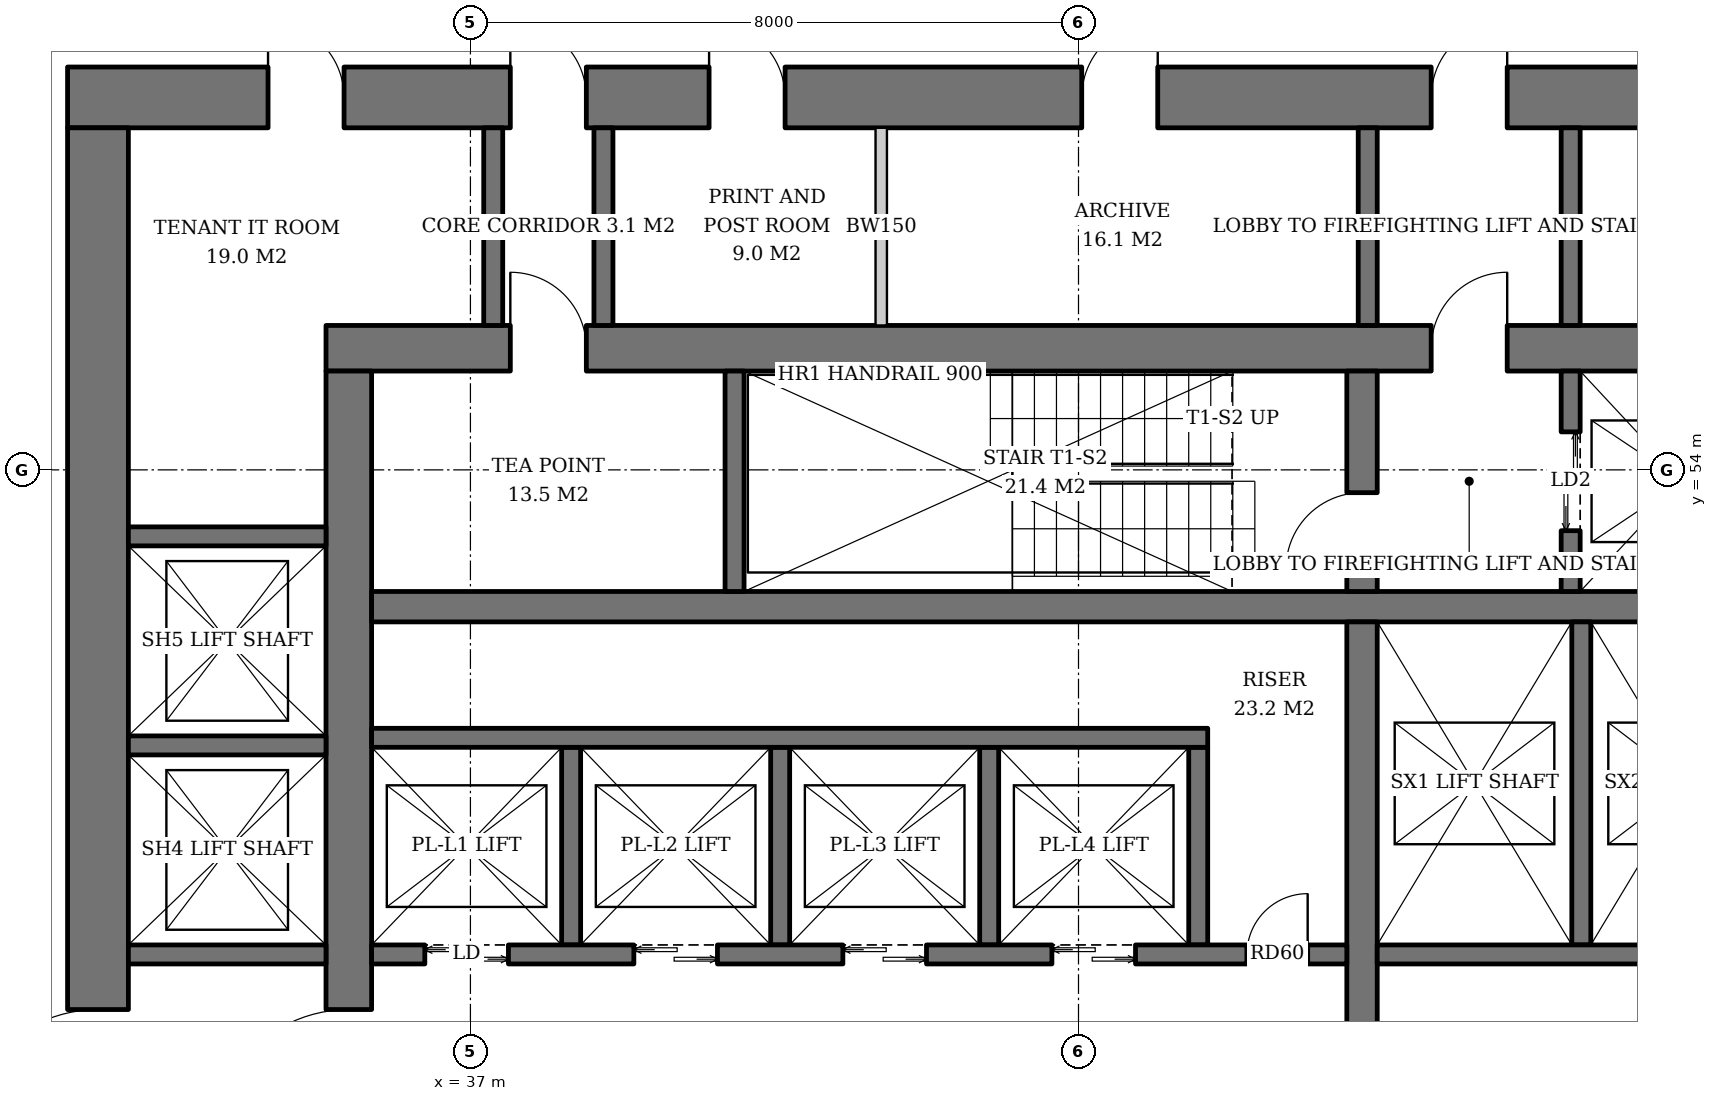
"""IFC4 building model, lengths in metres.
Left out: names, types, materials, properties, quantities, classifications, styles, units other than length and angle.
Written with IfcOpenShell. Run it as: python <this file> out.ifc"""

import sys

from ifc_helpers import new_model, si_unit, direction, frame, frame_2d, origin, place, context, subcontext, project, spatial, rectangle, extrude, element, fill, save


model = new_model("IFC4")
c1 = context("Model", 3, precision=1e-05, world=origin(), true_north=direction((0.0, 1.0)))
c2 = subcontext(c1, "Body", "Model", "MODEL_VIEW")
j1 = project(units=[si_unit("LENGTHUNIT", "METRE"), si_unit("PLANEANGLEUNIT", "RADIAN")], contexts=[c1])
p1 = place(None, origin())
s1 = spatial("IfcSite", under=j1, at=p1, CompositionType="ELEMENT")
p2 = place(p1, origin())
s2 = spatial("IfcBuilding", under=s1, at=p2, CompositionType="ELEMENT")
p3 = place(p2, frame((0.0, 0.0, 62.8)))
s3 = spatial("IfcBuildingStorey", under=s2, at=p3, CompositionType="ELEMENT", Elevation=62.8)
p4 = place(p3, frame((35.1, 55.6, 0.0), z_axis=(0.0, 0.0, 1.0), x_axis=(1.0, 0.0, 0.0)))
e1 = element("IfcWall", 1, at=p4, inside=s3, PredefinedType="SHEAR", context=c2, shape_type="SweptSolid", body=[
    extrude(rectangle(XDim=19.8, YDim=0.6, at=frame_2d((9.9, 0.0))), origin(), (0.0, 0.0, 1.0), 3.8),
])
p5 = place(p4, frame((14.54, 0.0, 0.0)))
e2 = element("IfcOpeningElement", 2, at=p5, cuts=e1, PredefinedType="OPENING", context=c2, shape_type="SweptSolid", body=[
    extrude(rectangle(XDim=1.0, YDim=2.1, at=frame_2d((0.5, 1.05))), frame((0.0, 0.31, 0.0), z_axis=(0.0, -1.0, 0.0), x_axis=(1.0, 0.0, 0.0)), (0.0, 0.0, 1.0), 0.62),
])
p6 = place(p4, frame((2.425, 0.0, 0.0)))
e3 = element("IfcOpeningElement", 3, at=p6, cuts=e1, PredefinedType="OPENING", context=c2, shape_type="SweptSolid", body=[
    extrude(rectangle(XDim=1.0, YDim=2.1, at=frame_2d((0.5, 1.05))), frame((0.0, 0.31, 0.0), z_axis=(0.0, -1.0, 0.0), x_axis=(1.0, 0.0, 0.0)), (0.0, 0.0, 1.0), 0.62),
])
p7 = place(p3, frame((35.4, 36.7, 0.0), z_axis=(0.0, 0.0, 1.0), x_axis=(0.0, 1.0, 0.0)))
e4 = element("IfcWall", 4, at=p7, inside=s3, PredefinedType="SHEAR", context=c2, shape_type="SweptSolid", body=[
    extrude(rectangle(XDim=18.6, YDim=0.6, at=frame_2d((9.3, 0.0))), origin(), (0.0, 0.0, 1.0), 3.8),
])
p8 = place(p7, frame((8.4, 0.0, 0.0)))
e5 = element("IfcOpeningElement", 5, at=p8, cuts=e4, PredefinedType="OPENING", context=c2, shape_type="SweptSolid", body=[
    extrude(rectangle(XDim=1.8, YDim=2.4, at=frame_2d((0.9, 1.2))), frame((0.0, 0.31, 0.0), z_axis=(0.0, -1.0, 0.0), x_axis=(1.0, 0.0, 0.0)), (0.0, 0.0, 1.0), 0.62),
])
p9 = place(p3, frame((31.7, 58.9, 0.0), z_axis=(0.0, 0.0, 1.0), x_axis=(1.0, 0.0, 0.0)))
e6 = element("IfcWall", 6, at=p9, inside=s3, PredefinedType="SHEAR", context=c2, shape_type="SweptSolid", body=[
    extrude(rectangle(XDim=26.6, YDim=0.8, at=frame_2d((13.3, 0.0))), origin(), (0.0, 0.0, 1.0), 3.8),
])
p10 = place(p9, frame((17.94, 0.0, 0.0)))
e7 = element("IfcOpeningElement", 7, at=p10, cuts=e6, PredefinedType="OPENING", context=c2, shape_type="SweptSolid", body=[
    extrude(rectangle(XDim=1.0, YDim=2.1, at=frame_2d((0.5, 1.05))), frame((0.0, 0.41, 0.0), z_axis=(0.0, -1.0, 0.0), x_axis=(1.0, 0.0, 0.0)), (0.0, 0.0, 1.0), 0.82),
])
p11 = place(p9, frame((5.825, 0.0, 0.0)))
e8 = element("IfcOpeningElement", 8, at=p11, cuts=e6, PredefinedType="OPENING", context=c2, shape_type="SweptSolid", body=[
    extrude(rectangle(XDim=1.0, YDim=2.1, at=frame_2d((0.5, 1.05))), frame((0.0, 0.41, 0.0), z_axis=(0.0, -1.0, 0.0), x_axis=(1.0, 0.0, 0.0)), (0.0, 0.0, 1.0), 0.82),
])
p12 = place(p9, frame((2.637, 0.0, 0.0)))
e9 = element("IfcOpeningElement", 9, at=p12, cuts=e6, PredefinedType="OPENING", context=c2, shape_type="SweptSolid", body=[
    extrude(rectangle(XDim=1.0, YDim=2.1, at=frame_2d((0.5, 1.05))), frame((0.0, 0.41, 0.0), z_axis=(0.0, -1.0, 0.0), x_axis=(1.0, 0.0, 0.0)), (0.0, 0.0, 1.0), 0.82),
])
p13 = place(p9, frame((8.44, 0.0, 0.0)))
e10 = element("IfcOpeningElement", 10, at=p13, cuts=e6, PredefinedType="OPENING", context=c2, shape_type="SweptSolid", body=[
    extrude(rectangle(XDim=1.0, YDim=2.1, at=frame_2d((0.5, 1.05))), frame((0.0, 0.41, 0.0), z_axis=(0.0, -1.0, 0.0), x_axis=(1.0, 0.0, 0.0)), (0.0, 0.0, 1.0), 0.82),
])
p14 = place(p9, frame((13.342, 0.0, 0.0)))
e11 = element("IfcOpeningElement", 11, at=p14, cuts=e6, PredefinedType="OPENING", context=c2, shape_type="SweptSolid", body=[
    extrude(rectangle(XDim=1.0, YDim=2.1, at=frame_2d((0.5, 1.05))), frame((0.0, 0.41, 0.0), z_axis=(0.0, -1.0, 0.0), x_axis=(1.0, 0.0, 0.0)), (0.0, 0.0, 1.0), 0.82),
])
p15 = place(p9, frame((22.35, 0.0, 0.0)))
e12 = element("IfcOpeningElement", 12, at=p15, cuts=e6, PredefinedType="OPENING", context=c2, shape_type="SweptSolid", body=[
    extrude(rectangle(XDim=1.0, YDim=2.1, at=frame_2d((0.5, 1.05))), frame((0.0, 0.41, 0.0), z_axis=(0.0, -1.0, 0.0), x_axis=(1.0, 0.0, 0.0)), (0.0, 0.0, 1.0), 0.82),
])
p16 = place(p3, frame((32.1, 33.5, 0.0), z_axis=(0.0, 0.0, 1.0), x_axis=(0.0, 1.0, 0.0)))
e13 = element("IfcWall", 13, at=p16, inside=s3, PredefinedType="SHEAR", context=c2, shape_type="SweptSolid", body=[
    extrude(rectangle(XDim=25.0, YDim=0.8, at=frame_2d((12.5, 0.0))), origin(), (0.0, 0.0, 1.0), 3.8),
])
p17 = place(p16, frame((11.6, 0.0, 0.0)))
e14 = element("IfcOpeningElement", 14, at=p17, cuts=e13, PredefinedType="OPENING", context=c2, shape_type="SweptSolid", body=[
    extrude(rectangle(XDim=1.8, YDim=2.4, at=frame_2d((0.9, 1.2))), frame((0.0, 0.41, 0.0), z_axis=(0.0, -1.0, 0.0), x_axis=(1.0, 0.0, 0.0)), (0.0, 0.0, 1.0), 0.82),
])
p18 = place(p3, frame((35.7, 52.2, 0.0), z_axis=(0.0, 0.0, 1.0), x_axis=(1.0, 0.0, 0.0)))
e15 = element("IfcWall", 15, at=p18, inside=s3, PredefinedType="SHEAR", context=c2, shape_type="SweptSolid", body=[
    extrude(rectangle(XDim=18.6, YDim=0.4, at=frame_2d((9.3, 0.0))), origin(), (0.0, 0.0, 1.0), 3.8),
])
p19 = place(p3, frame((48.73, 40.0, 0.0), z_axis=(0.0, 0.0, 1.0), x_axis=(0.0, 1.0, 0.0)))
e16 = element("IfcWall", 16, at=p19, inside=s3, PredefinedType="SHEAR", context=c2, shape_type="SweptSolid", body=[
    extrude(rectangle(XDim=12.0, YDim=0.4, at=frame_2d((6.0, 0.0))), origin(), (0.0, 0.0, 1.0), 3.8),
])
p20 = place(p3, frame((48.73, 52.4, 0.0), z_axis=(0.0, 0.0, 1.0), x_axis=(0.0, 1.0, 0.0)))
e17 = element("IfcWall", 17, at=p20, inside=s3, PredefinedType="SHEAR", context=c2, shape_type="SweptSolid", body=[
    extrude(rectangle(XDim=2.9, YDim=0.4, at=frame_2d((1.45, 0.0))), origin(), (0.0, 0.0, 1.0), 3.8),
])
p21 = place(p20, frame((0.3, 0.0, 0.0)))
e18 = element("IfcOpeningElement", 18, at=p21, cuts=e17, PredefinedType="OPENING", context=c2, shape_type="SweptSolid", body=[
    extrude(rectangle(XDim=1.0, YDim=2.1, at=frame_2d((0.5, 1.05))), frame((0.0, 0.21, 0.0), z_axis=(0.0, -1.0, 0.0), x_axis=(1.0, 0.0, 0.0)), (0.0, 0.0, 1.0), 0.42),
])
p22 = place(p3, frame((40.475, 52.4, 0.0), z_axis=(0.0, 0.0, 1.0), x_axis=(0.0, 1.0, 0.0)))
e19 = element("IfcWall", 19, at=p22, inside=s3, PredefinedType="SHEAR", context=c2, shape_type="SweptSolid", body=[
    extrude(rectangle(XDim=2.9, YDim=0.25, at=frame_2d((1.45, 0.0))), origin(), (0.0, 0.0, 1.0), 3.8),
])
p23 = place(p3, frame((51.475, 52.4, 0.0), z_axis=(0.0, 0.0, 1.0), x_axis=(0.0, 1.0, 0.0)))
e20 = element("IfcWall", 20, at=p23, inside=s3, PredefinedType="SHEAR", context=c2, shape_type="SweptSolid", body=[
    extrude(rectangle(XDim=2.9, YDim=0.25, at=frame_2d((1.45, 0.0))), origin(), (0.0, 0.0, 1.0), 3.8),
])
p24 = place(p23, frame((0.8, 0.0, 0.0)))
e21 = element("IfcOpeningElement", 21, at=p24, cuts=e20, PredefinedType="OPENING", context=c2, shape_type="SweptSolid", body=[
    extrude(rectangle(XDim=1.3, YDim=2.2, at=frame_2d((0.65, 1.1))), frame((0.0, 0.135, 0.0), z_axis=(0.0, -1.0, 0.0), x_axis=(1.0, 0.0, 0.0)), (0.0, 0.0, 1.0), 0.27),
])
for number, where, z_axis, x_axis in (
    (22, (38.325, 47.75, 0.0), (0.0, 0.0, 1.0), (0.0, 1.0, 0.0)),
    (23, (41.075, 47.75, 0.0), (0.0, 0.0, 1.0), (0.0, 1.0, 0.0)),
    (24, (43.825, 47.75, 0.0), (0.0, 0.0, 1.0), (0.0, 1.0, 0.0)),
    (25, (46.575, 47.75, 0.0), (0.0, 0.0, 1.0), (0.0, 1.0, 0.0)),
):
    element("IfcWall", number, at=place(p3, frame(where, z_axis=z_axis, x_axis=x_axis)), inside=s3, PredefinedType="SHEAR", context=c2, shape_type="SweptSolid", body=[
        extrude(rectangle(XDim=2.6, YDim=0.25, at=frame_2d((1.3, 0.0))), origin(), (0.0, 0.0, 1.0), 3.8),
    ])
p25 = place(p3, frame((35.7, 50.475, 0.0), z_axis=(0.0, 0.0, 1.0), x_axis=(1.0, 0.0, 0.0)))
e26 = element("IfcWall", 26, at=p25, inside=s3, PredefinedType="SHEAR", context=c2, shape_type="SweptSolid", body=[
    extrude(rectangle(XDim=11.0, YDim=0.25, at=frame_2d((5.5, 0.0))), origin(), (0.0, 0.0, 1.0), 3.8),
])
p26 = place(p3, frame((35.7, 47.625, 0.0), z_axis=(0.0, 0.0, 1.0), x_axis=(1.0, 0.0, 0.0)))
e27 = element("IfcWall", 27, at=p26, inside=s3, PredefinedType="SHEAR", context=c2, shape_type="SweptSolid", body=[
    extrude(rectangle(XDim=12.83, YDim=0.25, at=frame_2d((6.415, 0.0))), origin(), (0.0, 0.0, 1.0), 3.8),
])
p27 = place(p26, frame((0.7, 0.0, 0.0)))
e28 = element("IfcOpeningElement", 28, at=p27, cuts=e27, PredefinedType="OPENING", context=c2, shape_type="SweptSolid", body=[
    extrude(rectangle(XDim=1.1, YDim=2.2, at=frame_2d((0.55, 1.1))), frame((0.0, 0.135, 0.0), z_axis=(0.0, -1.0, 0.0), x_axis=(1.0, 0.0, 0.0)), (0.0, 0.0, 1.0), 0.27),
])
p28 = place(p26, frame((3.45, 0.0, 0.0)))
e29 = element("IfcOpeningElement", 29, at=p28, cuts=e27, PredefinedType="OPENING", context=c2, shape_type="SweptSolid", body=[
    extrude(rectangle(XDim=1.1, YDim=2.2, at=frame_2d((0.55, 1.1))), frame((0.0, 0.135, 0.0), z_axis=(0.0, -1.0, 0.0), x_axis=(1.0, 0.0, 0.0)), (0.0, 0.0, 1.0), 0.27),
])
p29 = place(p26, frame((6.2, 0.0, 0.0)))
e30 = element("IfcOpeningElement", 30, at=p29, cuts=e27, PredefinedType="OPENING", context=c2, shape_type="SweptSolid", body=[
    extrude(rectangle(XDim=1.1, YDim=2.2, at=frame_2d((0.55, 1.1))), frame((0.0, 0.135, 0.0), z_axis=(0.0, -1.0, 0.0), x_axis=(1.0, 0.0, 0.0)), (0.0, 0.0, 1.0), 0.27),
])
p30 = place(p26, frame((8.95, 0.0, 0.0)))
e31 = element("IfcOpeningElement", 31, at=p30, cuts=e27, PredefinedType="OPENING", context=c2, shape_type="SweptSolid", body=[
    extrude(rectangle(XDim=1.1, YDim=2.2, at=frame_2d((0.55, 1.1))), frame((0.0, 0.135, 0.0), z_axis=(0.0, -1.0, 0.0), x_axis=(1.0, 0.0, 0.0)), (0.0, 0.0, 1.0), 0.27),
])
p31 = place(p26, frame((11.515, 0.0, 0.0)))
e32 = element("IfcOpeningElement", 32, at=p31, cuts=e27, PredefinedType="OPENING", context=c2, shape_type="SweptSolid", body=[
    extrude(rectangle(XDim=0.8, YDim=2.0, at=frame_2d((0.4, 1.0))), frame((0.0, 0.135, 0.0), z_axis=(0.0, -1.0, 0.0), x_axis=(1.0, 0.0, 0.0)), (0.0, 0.0, 1.0), 0.27),
])
p32 = place(p3, frame((51.615, 47.75, 0.0), z_axis=(0.0, 0.0, 1.0), x_axis=(0.0, 1.0, 0.0)))
e33 = element("IfcWall", 33, at=p32, inside=s3, PredefinedType="SHEAR", context=c2, shape_type="SweptSolid", body=[
    extrude(rectangle(XDim=4.25, YDim=0.25, at=frame_2d((2.125, 0.0))), origin(), (0.0, 0.0, 1.0), 3.8),
])
p33 = place(p3, frame((48.93, 47.625, 0.0), z_axis=(0.0, 0.0, 1.0), x_axis=(1.0, 0.0, 0.0)))
e34 = element("IfcWall", 34, at=p33, inside=s3, PredefinedType="SHEAR", context=c2, shape_type="SweptSolid", body=[
    extrude(rectangle(XDim=5.37, YDim=0.25, at=frame_2d((2.685, 0.0))), origin(), (0.0, 0.0, 1.0), 3.8),
])
for number, where, z_axis, x_axis in (
    (35, (32.5, 47.625, 0.0), (0.0, 0.0, 1.0), (1.0, 0.0, 0.0)),
    (36, (32.5, 50.375, 0.0), (0.0, 0.0, 1.0), (1.0, 0.0, 0.0)),
    (37, (32.5, 53.125, 0.0), (0.0, 0.0, 1.0), (1.0, 0.0, 0.0)),
):
    element("IfcWall", number, at=place(p3, frame(where, z_axis=z_axis, x_axis=x_axis)), inside=s3, PredefinedType="SHEAR", context=c2, shape_type="SweptSolid", body=[
        extrude(rectangle(XDim=2.6, YDim=0.25, at=frame_2d((1.3, 0.0))), origin(), (0.0, 0.0, 1.0), 3.8),
    ])
for number, where, z_axis, x_axis in (
    (38, (48.805, 55.9, 0.0), (0.0, 0.0, 1.0), (0.0, 1.0, 0.0)),
    (39, (51.475, 55.9, 0.0), (0.0, 0.0, 1.0), (0.0, 1.0, 0.0)),
    (40, (37.3, 55.9, 0.0), (0.0, 0.0, 1.0), (0.0, 1.0, 0.0)),
    (41, (38.75, 55.9, 0.0), (0.0, 0.0, 1.0), (0.0, 1.0, 0.0)),
):
    element("IfcWall", number, at=place(p3, frame(where, z_axis=z_axis, x_axis=x_axis)), inside=s3, PredefinedType="SOLIDWALL", context=c2, shape_type="SweptSolid", body=[
        extrude(rectangle(XDim=2.6, YDim=0.25, at=frame_2d((1.3, 0.0))), origin(), (0.0, 0.0, 1.0), 3.62),
    ])
p34 = place(p3, frame((42.405, 55.9, 0.0), z_axis=(0.0, 0.0, 1.0), x_axis=(0.0, 1.0, 0.0)))
e42 = element("IfcWall", 42, at=p34, inside=s3, PredefinedType="SOLIDWALL", context=c2, shape_type="SweptSolid", body=[
    extrude(rectangle(XDim=2.6, YDim=0.15, at=frame_2d((1.3, 0.0))), origin(), (0.0, 0.0, 1.0), 3.62),
])
p35 = place(p24, origin())
e43 = element("IfcDoor", 43, at=p35, inside=s3, OperationType="DOUBLE_DOOR_SLIDING", PredefinedType="DOOR", context=c2, shape_type="SweptSolid", body=[
    extrude(rectangle(XDim=1.3, YDim=2.2, at=frame_2d((0.65, 1.1))), frame((0.0, 0.025, 0.0), z_axis=(0.0, -1.0, 0.0), x_axis=(1.0, 0.0, 0.0)), (0.0, 0.0, 1.0), 0.05),
])
fill(e21, e43)
p36 = place(p27, origin())
e44 = element("IfcDoor", 44, at=p36, inside=s3, OperationType="DOUBLE_DOOR_SLIDING", PredefinedType="DOOR", context=c2, shape_type="SweptSolid", body=[
    extrude(rectangle(XDim=1.1, YDim=2.2, at=frame_2d((0.55, 1.1))), frame((0.0, 0.025, 0.0), z_axis=(0.0, -1.0, 0.0), x_axis=(1.0, 0.0, 0.0)), (0.0, 0.0, 1.0), 0.05),
])
fill(e28, e44)
p37 = place(p28, origin())
e45 = element("IfcDoor", 45, at=p37, inside=s3, OperationType="DOUBLE_DOOR_SLIDING", PredefinedType="DOOR", context=c2, shape_type="SweptSolid", body=[
    extrude(rectangle(XDim=1.1, YDim=2.2, at=frame_2d((0.55, 1.1))), frame((0.0, 0.025, 0.0), z_axis=(0.0, -1.0, 0.0), x_axis=(1.0, 0.0, 0.0)), (0.0, 0.0, 1.0), 0.05),
])
fill(e29, e45)
p38 = place(p29, origin())
e46 = element("IfcDoor", 46, at=p38, inside=s3, OperationType="DOUBLE_DOOR_SLIDING", PredefinedType="DOOR", context=c2, shape_type="SweptSolid", body=[
    extrude(rectangle(XDim=1.1, YDim=2.2, at=frame_2d((0.55, 1.1))), frame((0.0, 0.025, 0.0), z_axis=(0.0, -1.0, 0.0), x_axis=(1.0, 0.0, 0.0)), (0.0, 0.0, 1.0), 0.05),
])
fill(e30, e46)
p39 = place(p30, origin())
e47 = element("IfcDoor", 47, at=p39, inside=s3, OperationType="DOUBLE_DOOR_SLIDING", PredefinedType="DOOR", context=c2, shape_type="SweptSolid", body=[
    extrude(rectangle(XDim=1.1, YDim=2.2, at=frame_2d((0.55, 1.1))), frame((0.0, 0.025, 0.0), z_axis=(0.0, -1.0, 0.0), x_axis=(1.0, 0.0, 0.0)), (0.0, 0.0, 1.0), 0.05),
])
fill(e31, e47)
p40 = place(p31, origin())
e48 = element("IfcDoor", 48, at=p40, inside=s3, OperationType="SINGLE_SWING_RIGHT", PredefinedType="DOOR", context=c2, shape_type="SweptSolid", body=[
    extrude(rectangle(XDim=0.8, YDim=2.0, at=frame_2d((0.4, 1.0))), frame((0.0, 0.025, 0.0), z_axis=(0.0, -1.0, 0.0), x_axis=(1.0, 0.0, 0.0)), (0.0, 0.0, 1.0), 0.05),
])
fill(e32, e48)
p41 = place(p21, origin())
e49 = element("IfcDoor", 49, at=p41, inside=s3, OperationType="SINGLE_SWING_LEFT", PredefinedType="DOOR", context=c2, shape_type="SweptSolid", body=[
    extrude(rectangle(XDim=1.0, YDim=2.1, at=frame_2d((0.5, 1.05))), frame((0.0, 0.025, 0.0), z_axis=(0.0, -1.0, 0.0), x_axis=(1.0, 0.0, 0.0)), (0.0, 0.0, 1.0), 0.05),
])
fill(e18, e49)
p42 = place(p5, origin())
e50 = element("IfcDoor", 50, at=p42, inside=s3, OperationType="SINGLE_SWING_RIGHT", PredefinedType="DOOR", context=c2, shape_type="SweptSolid", body=[
    extrude(rectangle(XDim=1.0, YDim=2.1, at=frame_2d((0.5, 1.05))), frame((0.0, 0.025, 0.0), z_axis=(0.0, -1.0, 0.0), x_axis=(1.0, 0.0, 0.0)), (0.0, 0.0, 1.0), 0.05),
])
fill(e2, e50)
p43 = place(p8, origin())
e51 = element("IfcDoor", 51, at=p43, inside=s3, OperationType="DOUBLE_DOOR_SINGLE_SWING", PredefinedType="DOOR", context=c2, shape_type="SweptSolid", body=[
    extrude(rectangle(XDim=1.8, YDim=2.4, at=frame_2d((0.9, 1.2))), frame((0.0, 0.025, 0.0), z_axis=(0.0, -1.0, 0.0), x_axis=(1.0, 0.0, 0.0)), (0.0, 0.0, 1.0), 0.05),
])
fill(e5, e51)
p44 = place(p17, origin())
e52 = element("IfcDoor", 52, at=p44, inside=s3, OperationType="DOUBLE_DOOR_SINGLE_SWING", PredefinedType="DOOR", context=c2, shape_type="SweptSolid", body=[
    extrude(rectangle(XDim=1.8, YDim=2.4, at=frame_2d((0.9, 1.2))), frame((0.0, 0.025, 0.0), z_axis=(0.0, -1.0, 0.0), x_axis=(1.0, 0.0, 0.0)), (0.0, 0.0, 1.0), 0.05),
])
fill(e14, e52)
p45 = place(p10, origin())
e53 = element("IfcDoor", 53, at=p45, inside=s3, OperationType="SINGLE_SWING_RIGHT", PredefinedType="DOOR", context=c2, shape_type="SweptSolid", body=[
    extrude(rectangle(XDim=1.0, YDim=2.1, at=frame_2d((0.5, 1.05))), frame((0.0, 0.025, 0.0), z_axis=(0.0, -1.0, 0.0), x_axis=(1.0, 0.0, 0.0)), (0.0, 0.0, 1.0), 0.05),
])
fill(e7, e53)
p46 = place(p11, origin())
e54 = element("IfcDoor", 54, at=p46, inside=s3, OperationType="SINGLE_SWING_LEFT", PredefinedType="DOOR", context=c2, shape_type="SweptSolid", body=[
    extrude(rectangle(XDim=1.0, YDim=2.1, at=frame_2d((0.5, 1.05))), frame((0.0, 0.025, 0.0), z_axis=(0.0, -1.0, 0.0), x_axis=(1.0, 0.0, 0.0)), (0.0, 0.0, 1.0), 0.05),
])
fill(e8, e54)
p47 = place(p6, origin())
e55 = element("IfcDoor", 55, at=p47, inside=s3, OperationType="SINGLE_SWING_LEFT", PredefinedType="DOOR", context=c2, shape_type="SweptSolid", body=[
    extrude(rectangle(XDim=1.0, YDim=2.1, at=frame_2d((0.5, 1.05))), frame((0.0, -0.24, 0.0), z_axis=(0.0, -1.0, 0.0), x_axis=(1.0, 0.0, 0.0)), (0.0, 0.0, 1.0), 0.05),
])
fill(e3, e55)
p48 = place(p12, origin())
e56 = element("IfcDoor", 56, at=p48, inside=s3, OperationType="SINGLE_SWING_LEFT", PredefinedType="DOOR", context=c2, shape_type="SweptSolid", body=[
    extrude(rectangle(XDim=1.0, YDim=2.1, at=frame_2d((0.5, 1.05))), frame((0.0, -0.34, 0.0), z_axis=(0.0, -1.0, 0.0), x_axis=(1.0, 0.0, 0.0)), (0.0, 0.0, 1.0), 0.05),
])
fill(e9, e56)
p49 = place(p13, origin())
e57 = element("IfcDoor", 57, at=p49, inside=s3, OperationType="SINGLE_SWING_LEFT", PredefinedType="DOOR", context=c2, shape_type="SweptSolid", body=[
    extrude(rectangle(XDim=1.0, YDim=2.1, at=frame_2d((0.5, 1.05))), frame((0.0, -0.34, 0.0), z_axis=(0.0, -1.0, 0.0), x_axis=(1.0, 0.0, 0.0)), (0.0, 0.0, 1.0), 0.05),
])
fill(e10, e57)
p50 = place(p14, origin())
e58 = element("IfcDoor", 58, at=p50, inside=s3, OperationType="SINGLE_SWING_RIGHT", PredefinedType="DOOR", context=c2, shape_type="SweptSolid", body=[
    extrude(rectangle(XDim=1.0, YDim=2.1, at=frame_2d((0.5, 1.05))), frame((0.0, -0.34, 0.0), z_axis=(0.0, -1.0, 0.0), x_axis=(1.0, 0.0, 0.0)), (0.0, 0.0, 1.0), 0.05),
])
fill(e11, e58)
save(model, sys.argv[1])
